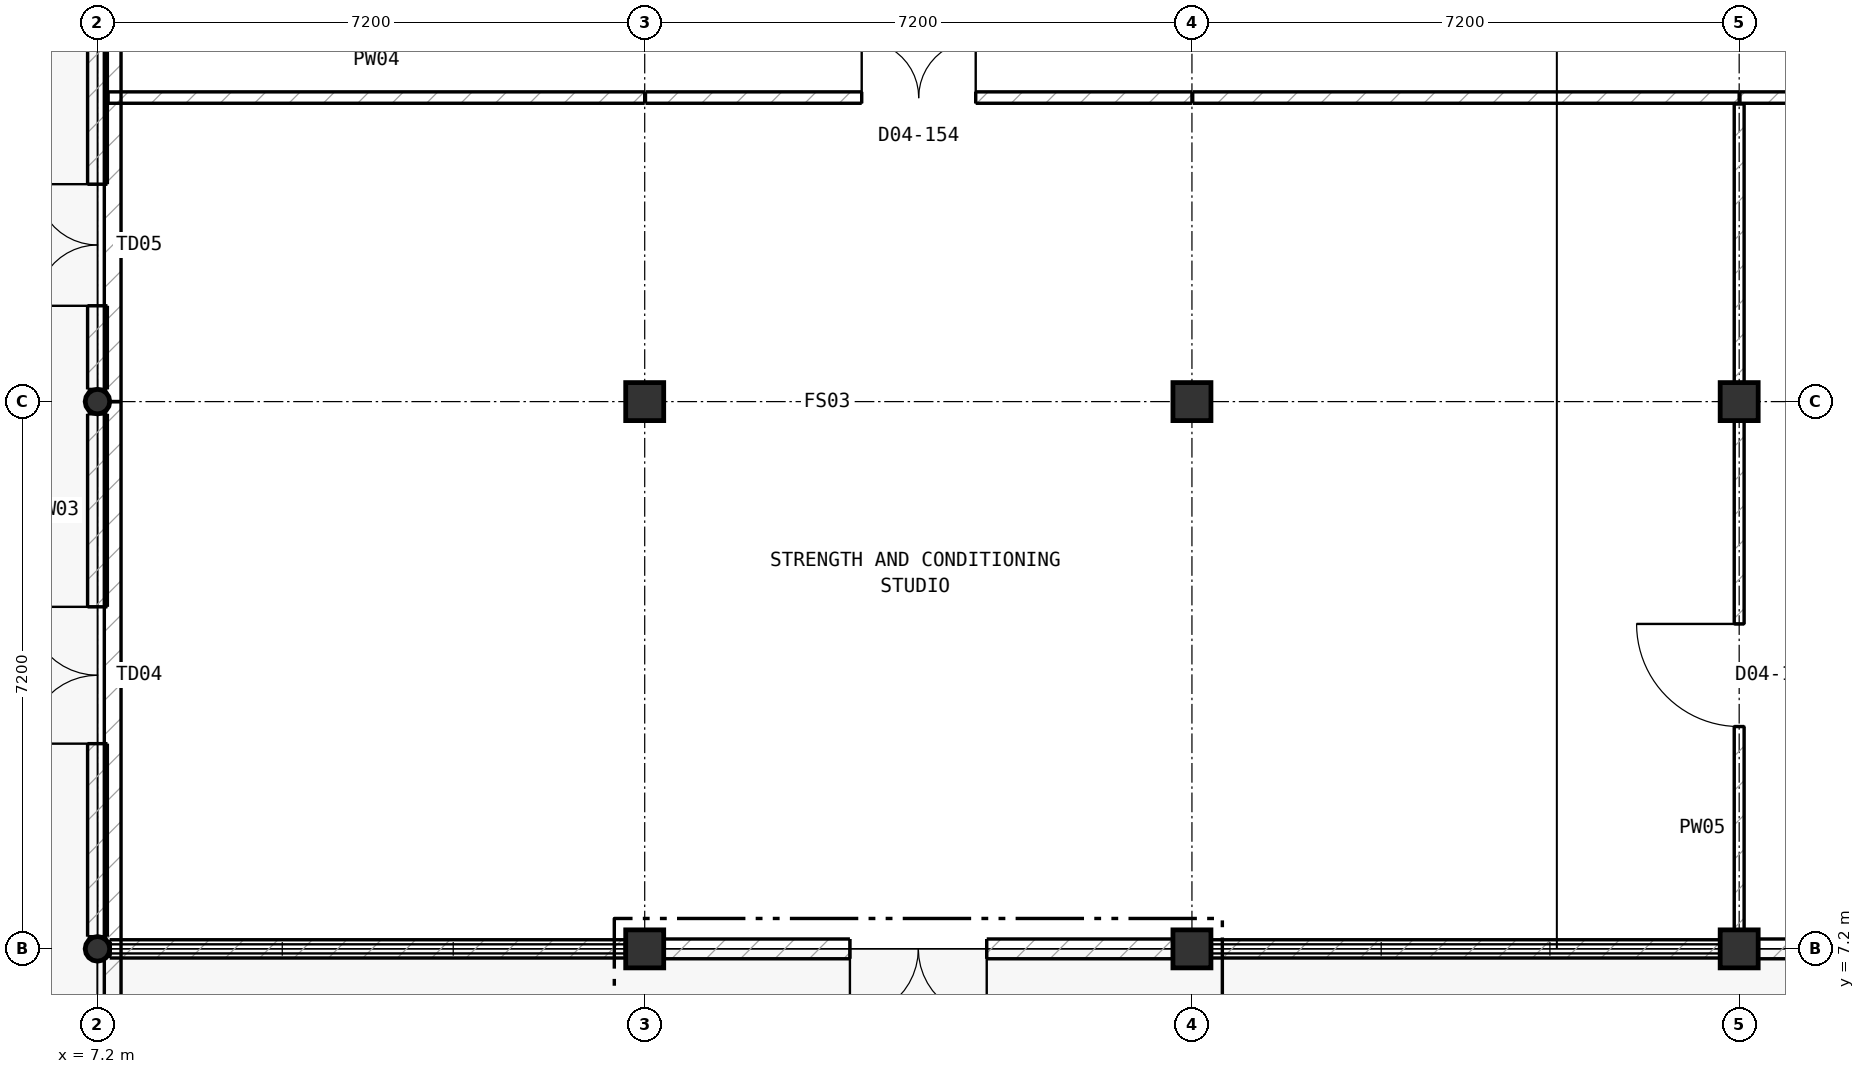
"""IFC4 building model, lengths in metres.
Left out: names, types, materials, properties, quantities, classifications, styles, units other than length and angle.
Written with IfcOpenShell. Run it as: python <this file> out.ifc"""

import sys

from ifc_helpers import new_model, si_unit, direction, frame, frame_2d, origin, origin_2d, place, context, subcontext, project, spatial, rectangle, hollow_circle, extrude, element, fill, save


model = new_model("IFC4")
c1 = context("Model", 3, precision=1e-05, world=origin(), true_north=direction((0.0, 1.0)))
c2 = subcontext(c1, "Body", "Model", "MODEL_VIEW")
j1 = project(units=[si_unit("LENGTHUNIT", "METRE"), si_unit("PLANEANGLEUNIT", "RADIAN")], contexts=[c1])
p1 = place(None, origin())
s1 = spatial("IfcSite", under=j1, at=p1, CompositionType="ELEMENT")
p2 = place(p1, origin())
s2 = spatial("IfcBuilding", under=s1, at=p2, CompositionType="ELEMENT")
p3 = place(p2, frame((0.0, 0.0, 20.4)))
s3 = spatial("IfcBuildingStorey", under=s2, at=p3, CompositionType="ELEMENT", Elevation=20.4)
for number, where, z_axis, x_axis in (
    (1, (7.2, 7.2, 0.0), (0.0, 0.0, 1.0), (1.0, 0.0, 0.0)),
    (2, (7.2, 14.4, 0.0), (0.0, 0.0, 1.0), (1.0, 0.0, 0.0)),
):
    element("IfcColumn", number, at=place(p3, frame(where, z_axis=z_axis, x_axis=x_axis)), inside=s3, PredefinedType="COLUMN", context=c2, shape_type="SweptSolid", body=[
        extrude(hollow_circle(Radius=0.162, WallThickness=0.012, at=origin_2d()), origin(), (0.0, 0.0, 1.0), 4.17),
    ])
for number, where, z_axis, x_axis in (
    (3, (14.4, 7.2, 0.0), (0.0, 0.0, 1.0), (1.0, 0.0, 0.0)),
    (4, (14.4, 14.4, 0.0), (0.0, 0.0, 1.0), (1.0, 0.0, 0.0)),
    (5, (21.6, 7.2, 0.0), (0.0, 0.0, 1.0), (1.0, 0.0, 0.0)),
    (6, (21.6, 14.4, 0.0), (0.0, 0.0, 1.0), (1.0, 0.0, 0.0)),
    (7, (28.8, 7.2, 0.0), (0.0, 0.0, 1.0), (1.0, 0.0, 0.0)),
    (8, (28.8, 14.4, 0.0), (0.0, 0.0, 1.0), (1.0, 0.0, 0.0)),
):
    element("IfcColumn", number, at=place(p3, frame(where, z_axis=z_axis, x_axis=x_axis)), inside=s3, PredefinedType="COLUMN", context=c2, shape_type="SweptSolid", body=[
        extrude(rectangle(XDim=0.5, YDim=0.5, at=origin_2d()), origin(), (0.0, 0.0, 1.0), 4.4),
    ])
p4 = place(p3, frame((35.765, 7.2, 0.0), z_axis=(0.0, 0.0, 1.0), x_axis=(-1.0, 0.0, 0.0)))
e9 = element("IfcWall", 9, at=p4, inside=s3, PredefinedType="SOLIDWALL", context=c2, shape_type="SweptSolid", body=[
    extrude(rectangle(XDim=6.73, YDim=0.26, at=frame_2d((3.365, 0.0))), origin(), (0.0, 0.0, 1.0), 3.655),
])
p5 = place(p4, frame((2.465, 0.0, 0.0)))
e10 = element("IfcOpeningElement", 10, at=p5, cuts=e9, PredefinedType="OPENING", context=c2, shape_type="SweptSolid", body=[
    extrude(rectangle(XDim=1.8, YDim=2.3, at=frame_2d((0.9, 1.15))), frame((0.0, 0.14, 0.0), z_axis=(0.0, -1.0, 0.0), x_axis=(1.0, 0.0, 0.0)), (0.0, 0.0, 1.0), 0.28),
])
p6 = place(p3, frame((28.565, 7.2, 0.0), z_axis=(0.0, 0.0, 1.0), x_axis=(-1.0, 0.0, 0.0)))
e11 = element("IfcWall", 11, at=p6, inside=s3, PredefinedType="SOLIDWALL", context=c2, shape_type="SweptSolid", body=[
    extrude(rectangle(XDim=6.73, YDim=0.24, at=frame_2d((3.365, 0.0))), origin(), (0.0, 0.0, 1.0), 0.3),
])
p7 = place(p3, frame((21.365, 7.2, 0.0), z_axis=(0.0, 0.0, 1.0), x_axis=(-1.0, 0.0, 0.0)))
e12 = element("IfcWall", 12, at=p7, inside=s3, PredefinedType="SOLIDWALL", context=c2, shape_type="SweptSolid", body=[
    extrude(rectangle(XDim=6.73, YDim=0.26, at=frame_2d((3.365, 0.0))), origin(), (0.0, 0.0, 1.0), 3.655),
])
p8 = place(p7, frame((2.465, 0.0, 0.0)))
e13 = element("IfcOpeningElement", 13, at=p8, cuts=e12, PredefinedType="OPENING", context=c2, shape_type="SweptSolid", body=[
    extrude(rectangle(XDim=1.8, YDim=2.3, at=frame_2d((0.9, 1.15))), frame((0.0, 0.14, 0.0), z_axis=(0.0, -1.0, 0.0), x_axis=(1.0, 0.0, 0.0)), (0.0, 0.0, 1.0), 0.28),
])
p9 = place(p3, frame((14.165, 7.2, 0.0), z_axis=(0.0, 0.0, 1.0), x_axis=(-1.0, 0.0, 0.0)))
e14 = element("IfcWall", 14, at=p9, inside=s3, PredefinedType="SOLIDWALL", context=c2, shape_type="SweptSolid", body=[
    extrude(rectangle(XDim=6.805, YDim=0.24, at=frame_2d((3.402, 0.0))), origin(), (0.0, 0.0, 1.0), 0.3),
])
p10 = place(p3, frame((7.2, 7.36, 0.0), z_axis=(0.0, 0.0, 1.0), x_axis=(0.0, 1.0, 0.0)))
e15 = element("IfcWall", 15, at=p10, inside=s3, PredefinedType="SOLIDWALL", context=c2, shape_type="SweptSolid", body=[
    extrude(rectangle(XDim=6.879, YDim=0.26, at=frame_2d((3.439, 0.0))), origin(), (0.0, 0.0, 1.0), 3.705),
])
p11 = place(p10, frame((2.54, 0.0, 0.0)))
e16 = element("IfcOpeningElement", 16, at=p11, cuts=e15, PredefinedType="OPENING", context=c2, shape_type="SweptSolid", body=[
    extrude(rectangle(XDim=1.8, YDim=2.3, at=frame_2d((0.9, 1.15))), frame((0.0, 0.14, 0.0), z_axis=(0.0, -1.0, 0.0), x_axis=(1.0, 0.0, 0.0)), (0.0, 0.0, 1.0), 0.28),
])
p12 = place(p3, frame((7.2, 14.561, 0.0), z_axis=(0.0, 0.0, 1.0), x_axis=(0.0, 1.0, 0.0)))
e17 = element("IfcWall", 17, at=p12, inside=s3, PredefinedType="SOLIDWALL", context=c2, shape_type="SweptSolid", body=[
    extrude(rectangle(XDim=6.879, YDim=0.26, at=frame_2d((3.439, 0.0))), origin(), (0.0, 0.0, 1.0), 3.705),
])
p13 = place(p12, frame((1.1, 0.0, 0.0)))
e18 = element("IfcOpeningElement", 18, at=p13, cuts=e17, PredefinedType="OPENING", context=c2, shape_type="SweptSolid", body=[
    extrude(rectangle(XDim=1.6, YDim=2.3, at=frame_2d((0.8, 1.15))), frame((0.0, 0.14, 0.0), z_axis=(0.0, -1.0, 0.0), x_axis=(1.0, 0.0, 0.0)), (0.0, 0.0, 1.0), 0.28),
])
p14 = place(p3, frame((7.4, 28.6, 4.4), z_axis=(0.0, 0.0, 1.0), x_axis=(0.0, -1.0, 0.0)))
e19 = element("IfcWall", 19, at=p14, inside=s3, PredefinedType="PARAPET", context=c2, shape_type="SweptSolid", body=[
    extrude(rectangle(XDim=14.2, YDim=0.22, at=frame_2d((7.1, 0.0))), origin(), (0.0, 0.0, 1.0), 1.15),
])
p15 = place(p3, frame((7.4, 14.4, 4.4), z_axis=(0.0, 0.0, 1.0), x_axis=(0.0, -1.0, 0.0)))
e20 = element("IfcWall", 20, at=p15, inside=s3, PredefinedType="PARAPET", context=c2, shape_type="SweptSolid", body=[
    extrude(rectangle(XDim=14.2, YDim=0.22, at=frame_2d((7.1, 0.0))), origin(), (0.0, 0.0, 1.0), 1.15),
])
p16 = place(p3, frame((7.34, 18.4, 0.0), z_axis=(0.0, 0.0, 1.0), x_axis=(1.0, 0.0, 0.0)))
e21 = element("IfcWall", 21, at=p16, inside=s3, PredefinedType="PARTITIONING", context=c2, shape_type="SweptSolid", body=[
    extrude(rectangle(XDim=7.06, YDim=0.15, at=frame_2d((3.53, 0.0))), origin(), (0.0, 0.0, 1.0), 4.12),
])
p17 = place(p3, frame((14.41, 18.4, 0.0), z_axis=(0.0, 0.0, 1.0), x_axis=(1.0, 0.0, 0.0)))
e22 = element("IfcWall", 22, at=p17, inside=s3, PredefinedType="PARTITIONING", context=c2, shape_type="SweptSolid", body=[
    extrude(rectangle(XDim=7.19, YDim=0.15, at=frame_2d((3.595, 0.0))), origin(), (0.0, 0.0, 1.0), 4.12),
])
p18 = place(p17, frame((2.845, 0.0, 0.0)))
e23 = element("IfcOpeningElement", 23, at=p18, cuts=e22, PredefinedType="OPENING", context=c2, shape_type="SweptSolid", body=[
    extrude(rectangle(XDim=1.5, YDim=2.2, at=frame_2d((0.75, 1.1))), frame((0.0, 0.085, 0.0), z_axis=(0.0, -1.0, 0.0), x_axis=(1.0, 0.0, 0.0)), (0.0, 0.0, 1.0), 0.17),
])
p19 = place(p3, frame((21.61, 18.4, 0.0), z_axis=(0.0, 0.0, 1.0), x_axis=(1.0, 0.0, 0.0)))
e24 = element("IfcWall", 24, at=p19, inside=s3, PredefinedType="PARTITIONING", context=c2, shape_type="SweptSolid", body=[
    extrude(rectangle(XDim=7.19, YDim=0.15, at=frame_2d((3.595, 0.0))), origin(), (0.0, 0.0, 1.0), 4.12),
])
p20 = place(p3, frame((28.81, 18.4, 0.0), z_axis=(0.0, 0.0, 1.0), x_axis=(1.0, 0.0, 0.0)))
e25 = element("IfcWall", 25, at=p20, inside=s3, PredefinedType="PARTITIONING", context=c2, shape_type="SweptSolid", body=[
    extrude(rectangle(XDim=7.19, YDim=0.15, at=frame_2d((3.595, 0.0))), origin(), (0.0, 0.0, 1.0), 4.12),
])
p21 = place(p20, frame((2.845, 0.0, 0.0)))
e26 = element("IfcOpeningElement", 26, at=p21, cuts=e25, PredefinedType="OPENING", context=c2, shape_type="SweptSolid", body=[
    extrude(rectangle(XDim=1.5, YDim=2.2, at=frame_2d((0.75, 1.1))), frame((0.0, 0.085, 0.0), z_axis=(0.0, -1.0, 0.0), x_axis=(1.0, 0.0, 0.0)), (0.0, 0.0, 1.0), 0.17),
])
p22 = place(p3, frame((28.8, 7.45, 0.0), z_axis=(0.0, 0.0, 1.0), x_axis=(0.0, 1.0, 0.0)))
e27 = element("IfcWall", 27, at=p22, inside=s3, PredefinedType="PARTITIONING", context=c2, shape_type="SweptSolid", body=[
    extrude(rectangle(XDim=6.7, YDim=0.13, at=frame_2d((3.35, 0.0))), origin(), (0.0, 0.0, 1.0), 3.65),
])
p23 = place(p22, frame((2.675, 0.0, 0.0)))
e28 = element("IfcOpeningElement", 28, at=p23, cuts=e27, PredefinedType="OPENING", context=c2, shape_type="SweptSolid", body=[
    extrude(rectangle(XDim=1.35, YDim=2.15, at=frame_2d((0.675, 1.075))), frame((0.0, 0.075, 0.0), z_axis=(0.0, -1.0, 0.0), x_axis=(1.0, 0.0, 0.0)), (0.0, 0.0, 1.0), 0.15),
])
p24 = place(p3, frame((28.8, 14.65, 0.0), z_axis=(0.0, 0.0, 1.0), x_axis=(0.0, 1.0, 0.0)))
e29 = element("IfcWall", 29, at=p24, inside=s3, PredefinedType="PARTITIONING", context=c2, shape_type="SweptSolid", body=[
    extrude(rectangle(XDim=3.665, YDim=0.13, at=frame_2d((1.833, 0.0))), origin(), (0.0, 0.0, 1.0), 3.65),
])
p25 = place(p8, origin())
e30 = element("IfcDoor", 30, at=p25, inside=s3, OperationType="DOUBLE_DOOR_SINGLE_SWING", PredefinedType="DOOR", context=c2, shape_type="SweptSolid", body=[
    extrude(rectangle(XDim=1.8, YDim=2.3, at=frame_2d((0.9, 1.15))), frame((0.0, 0.025, 0.0), z_axis=(0.0, -1.0, 0.0), x_axis=(1.0, 0.0, 0.0)), (0.0, 0.0, 1.0), 0.05),
])
fill(e13, e30)
p26 = place(p11, origin())
e31 = element("IfcDoor", 31, at=p26, inside=s3, OperationType="DOUBLE_DOOR_SINGLE_SWING", PredefinedType="DOOR", context=c2, shape_type="SweptSolid", body=[
    extrude(rectangle(XDim=1.8, YDim=2.3, at=frame_2d((0.9, 1.15))), frame((0.0, 0.025, 0.0), z_axis=(0.0, -1.0, 0.0), x_axis=(1.0, 0.0, 0.0)), (0.0, 0.0, 1.0), 0.05),
])
fill(e16, e31)
p27 = place(p13, origin())
e32 = element("IfcDoor", 32, at=p27, inside=s3, OperationType="DOUBLE_DOOR_SINGLE_SWING", PredefinedType="DOOR", context=c2, shape_type="SweptSolid", body=[
    extrude(rectangle(XDim=1.6, YDim=2.3, at=frame_2d((0.8, 1.15))), frame((0.0, 0.025, 0.0), z_axis=(0.0, -1.0, 0.0), x_axis=(1.0, 0.0, 0.0)), (0.0, 0.0, 1.0), 0.05),
])
fill(e18, e32)
p28 = place(p18, origin())
e33 = element("IfcDoor", 33, at=p28, inside=s3, OperationType="DOUBLE_DOOR_SINGLE_SWING", PredefinedType="DOOR", context=c2, shape_type="SweptSolid", body=[
    extrude(rectangle(XDim=1.5, YDim=2.2, at=frame_2d((0.75, 1.1))), frame((0.0, 0.025, 0.0), z_axis=(0.0, -1.0, 0.0), x_axis=(1.0, 0.0, 0.0)), (0.0, 0.0, 1.0), 0.05),
])
fill(e23, e33)
p29 = place(p23, origin())
e34 = element("IfcDoor", 34, at=p29, inside=s3, OperationType="SINGLE_SWING_RIGHT", PredefinedType="DOOR", context=c2, shape_type="SweptSolid", body=[
    extrude(rectangle(XDim=1.35, YDim=2.15, at=frame_2d((0.675, 1.075))), frame((0.0, 0.025, 0.0), z_axis=(0.0, -1.0, 0.0), x_axis=(1.0, 0.0, 0.0)), (0.0, 0.0, 1.0), 0.05),
])
fill(e28, e34)
save(model, sys.argv[1])
